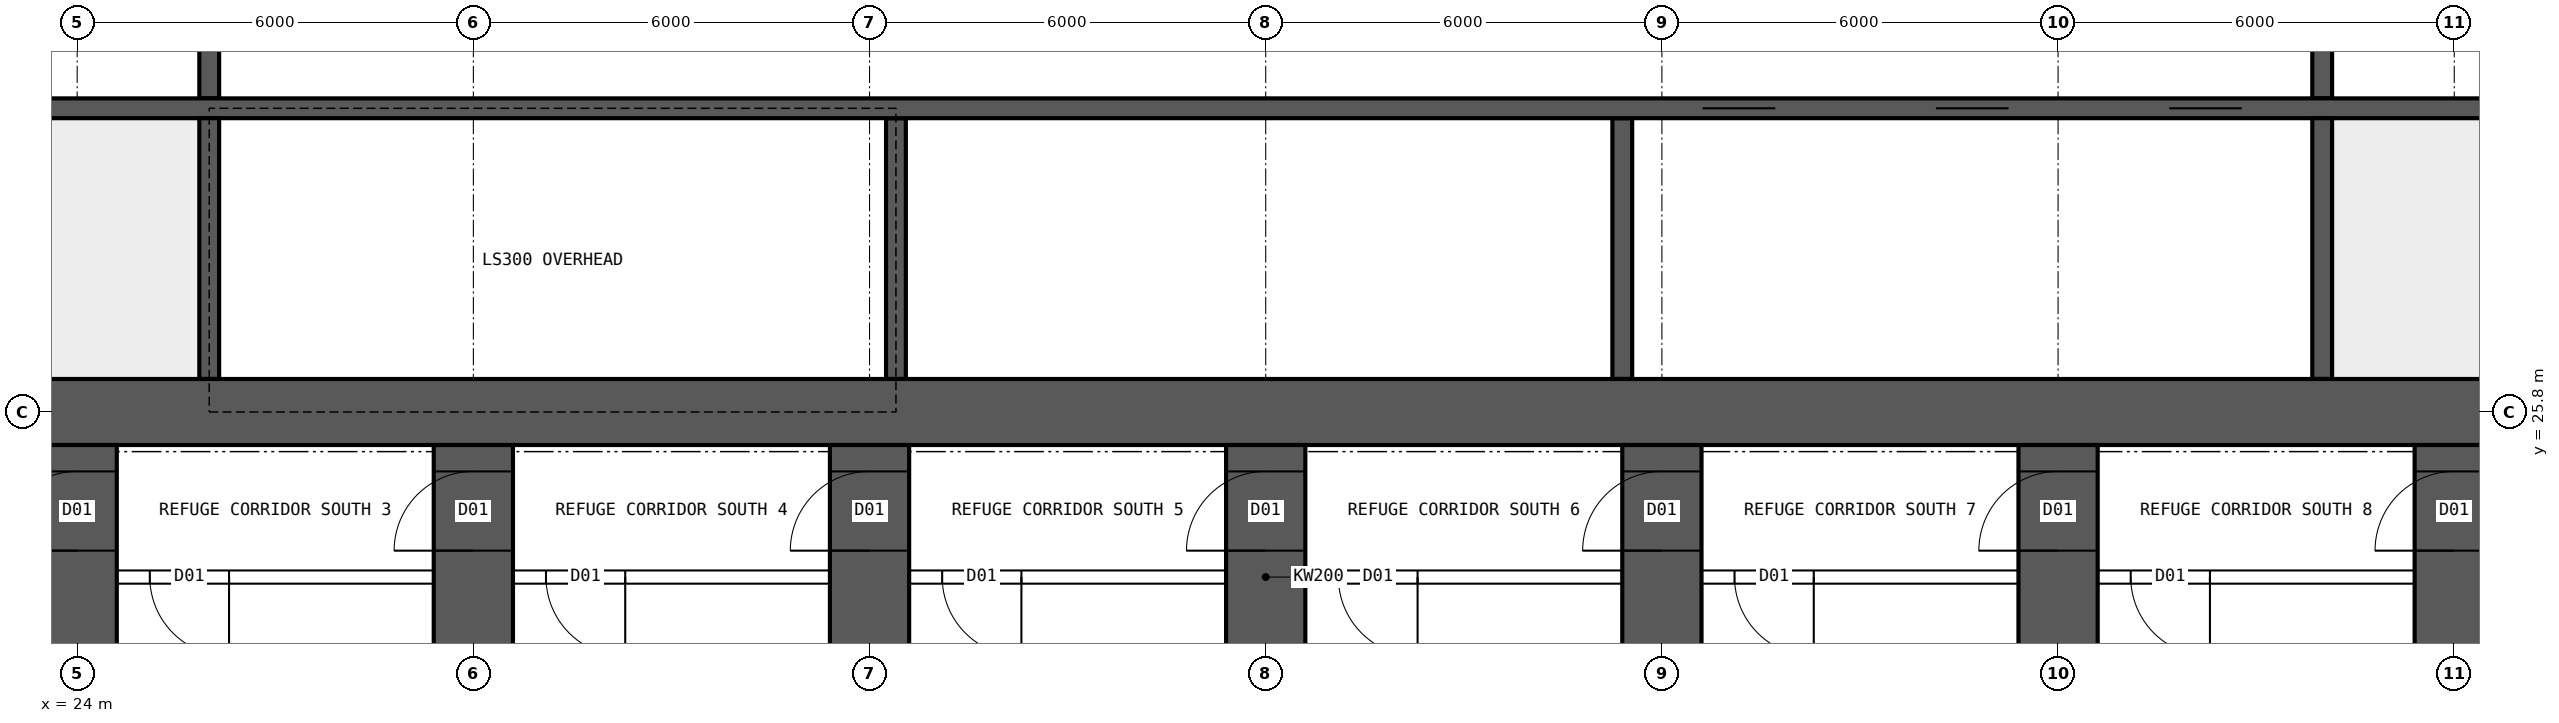
"""IFC4 building model, lengths in metres.
Left out: names, types, materials, properties, quantities, classifications, styles, units other than length and angle.
Written with IfcOpenShell. Run it as: python <this file> out.ifc"""

import sys

from ifc_helpers import new_model, si_unit, direction, frame, frame_2d, origin, place, context, subcontext, project, spatial, rectangle, extrude, element, fill, save


model = new_model("IFC4")
c1 = context("Model", 3, precision=1e-05, world=origin(), true_north=direction((0.0, 1.0)))
c2 = subcontext(c1, "Body", "Model", "MODEL_VIEW")
j1 = project(units=[si_unit("LENGTHUNIT", "METRE"), si_unit("PLANEANGLEUNIT", "RADIAN")], contexts=[c1])
p1 = place(None, origin())
s1 = spatial("IfcSite", under=j1, at=p1, CompositionType="ELEMENT")
p2 = place(p1, origin())
s2 = spatial("IfcBuilding", under=s1, at=p2, CompositionType="ELEMENT")
p3 = place(p2, frame((0.0, 0.0, 68.95)))
s3 = spatial("IfcBuildingStorey", under=s2, at=p3, CompositionType="ELEMENT", Elevation=68.95)
p4 = place(p3, frame((18.0, 25.8, 0.0), z_axis=(0.0, 0.0, 1.0), x_axis=(1.0, 0.0, 0.0)))
e1 = element("IfcWall", 1, at=p4, inside=s3, PredefinedType="SHEAR", context=c2, shape_type="SweptSolid", body=[
    extrude(rectangle(XDim=48.0, YDim=1.0, at=frame_2d((24.0, 0.0))), origin(), (0.0, 0.0, 1.0), 7.2),
])
p5 = place(p3, frame((18.5, 30.4, 0.0), z_axis=(0.0, 0.0, 1.0), x_axis=(1.0, 0.0, 0.0)))
e2 = element("IfcWall", 2, at=p5, inside=s3, PredefinedType="SHEAR", context=c2, shape_type="SweptSolid", body=[
    extrude(rectangle(XDim=47.0, YDim=0.3, at=frame_2d((23.5, 0.0))), origin(), (0.0, 0.0, 1.0), 7.2),
])
p6 = place(p5, frame((0.4, 0.0, 0.0)))
e3 = element("IfcOpeningElement", 3, at=p6, cuts=e2, PredefinedType="OPENING", context=c2, shape_type="SweptSolid", body=[
    extrude(rectangle(XDim=1.0, YDim=2.1, at=frame_2d((0.5, 1.05))), frame((0.0, 0.16, 0.0), z_axis=(0.0, -1.0, 0.0), x_axis=(1.0, 0.0, 0.0)), (0.0, 0.0, 1.0), 0.32),
])
p7 = place(p5, frame((45.6, 0.0, 0.0)))
e4 = element("IfcOpeningElement", 4, at=p7, cuts=e2, PredefinedType="OPENING", context=c2, shape_type="SweptSolid", body=[
    extrude(rectangle(XDim=1.0, YDim=2.1, at=frame_2d((0.5, 1.05))), frame((0.0, 0.16, 0.0), z_axis=(0.0, -1.0, 0.0), x_axis=(1.0, 0.0, 0.0)), (0.0, 0.0, 1.0), 0.32),
])
p8 = place(p5, frame((30.117, 0.0, 0.0)))
e5 = element("IfcOpeningElement", 5, at=p8, cuts=e2, PredefinedType="OPENING", context=c2, shape_type="SweptSolid", body=[
    extrude(rectangle(XDim=1.1, YDim=2.1, at=frame_2d((0.55, 1.05))), frame((0.0, 0.16, 0.0), z_axis=(0.0, -1.0, 0.0), x_axis=(1.0, 0.0, 0.0)), (0.0, 0.0, 1.0), 0.32),
])
p9 = place(p5, frame((33.65, 0.0, 0.0)))
e6 = element("IfcOpeningElement", 6, at=p9, cuts=e2, PredefinedType="OPENING", context=c2, shape_type="SweptSolid", body=[
    extrude(rectangle(XDim=1.1, YDim=2.1, at=frame_2d((0.55, 1.05))), frame((0.0, 0.16, 0.0), z_axis=(0.0, -1.0, 0.0), x_axis=(1.0, 0.0, 0.0)), (0.0, 0.0, 1.0), 0.32),
])
p10 = place(p5, frame((37.183, 0.0, 0.0)))
e7 = element("IfcOpeningElement", 7, at=p10, cuts=e2, PredefinedType="OPENING", context=c2, shape_type="SweptSolid", body=[
    extrude(rectangle(XDim=1.1, YDim=2.1, at=frame_2d((0.55, 1.05))), frame((0.0, 0.16, 0.0), z_axis=(0.0, -1.0, 0.0), x_axis=(1.0, 0.0, 0.0)), (0.0, 0.0, 1.0), 0.32),
])
for number, where, z_axis, x_axis in (
    (8, (26.0, 26.3, 0.0), (0.0, 0.0, 1.0), (0.0, 1.0, 0.0)),
    (9, (58.0, 26.3, 0.0), (0.0, 0.0, 1.0), (0.0, 1.0, 0.0)),
):
    element("IfcWall", number, at=place(p3, frame(where, z_axis=z_axis, x_axis=x_axis)), inside=s3, PredefinedType="SHEAR", context=c2, shape_type="SweptSolid", body=[
        extrude(rectangle(XDim=3.95, YDim=0.3, at=frame_2d((1.975, 0.0))), origin(), (0.0, 0.0, 1.0), 7.2),
    ])
p11 = place(p3, frame((26.0, 30.55, 0.0), z_axis=(0.0, 0.0, 1.0), x_axis=(0.0, 1.0, 0.0)))
e10 = element("IfcWall", 10, at=p11, inside=s3, PredefinedType="SHEAR", context=c2, shape_type="SweptSolid", body=[
    extrude(rectangle(XDim=3.9, YDim=0.3, at=frame_2d((1.95, 0.0))), origin(), (0.0, 0.0, 1.0), 7.2),
])
p12 = place(p11, frame((1.4, 0.0, 0.0)))
e11 = element("IfcOpeningElement", 11, at=p12, cuts=e10, PredefinedType="OPENING", context=c2, shape_type="SweptSolid", body=[
    extrude(rectangle(XDim=1.2, YDim=2.1, at=frame_2d((0.6, 1.05))), frame((0.0, 0.16, 0.0), z_axis=(0.0, -1.0, 0.0), x_axis=(1.0, 0.0, 0.0)), (0.0, 0.0, 1.0), 0.32),
])
p13 = place(p3, frame((58.0, 30.55, 0.0), z_axis=(0.0, 0.0, 1.0), x_axis=(0.0, 1.0, 0.0)))
e12 = element("IfcWall", 12, at=p13, inside=s3, PredefinedType="SHEAR", context=c2, shape_type="SweptSolid", body=[
    extrude(rectangle(XDim=3.9, YDim=0.3, at=frame_2d((1.95, 0.0))), origin(), (0.0, 0.0, 1.0), 7.2),
])
p14 = place(p13, frame((1.4, 0.0, 0.0)))
e13 = element("IfcOpeningElement", 13, at=p14, cuts=e12, PredefinedType="OPENING", context=c2, shape_type="SweptSolid", body=[
    extrude(rectangle(XDim=1.2, YDim=2.1, at=frame_2d((0.6, 1.05))), frame((0.0, 0.16, 0.0), z_axis=(0.0, -1.0, 0.0), x_axis=(1.0, 0.0, 0.0)), (0.0, 0.0, 1.0), 0.32),
])
for number, where, z_axis, x_axis in (
    (14, (36.4, 26.3, 0.0), (0.0, 0.0, 1.0), (0.0, 1.0, 0.0)),
    (15, (47.4, 26.3, 0.0), (0.0, 0.0, 1.0), (0.0, 1.0, 0.0)),
):
    element("IfcWall", number, at=place(p3, frame(where, z_axis=z_axis, x_axis=x_axis)), inside=s3, PredefinedType="SHEAR", context=c2, shape_type="SweptSolid", body=[
        extrude(rectangle(XDim=3.95, YDim=0.3, at=frame_2d((1.975, 0.0))), origin(), (0.0, 0.0, 1.0), 7.2),
    ])
p15 = place(p3, frame((24.0, 7.7, 0.0), z_axis=(0.0, 0.0, 1.0), x_axis=(0.0, 1.0, 0.0)))
e16 = element("IfcWall", 16, at=p15, inside=s3, PredefinedType="SHEAR", context=c2, shape_type="SweptSolid", body=[
    extrude(rectangle(XDim=17.6, YDim=1.2, at=frame_2d((8.8, 0.0))), origin(), (0.0, 0.0, 1.0), 7.2),
])
p16 = place(p15, frame((16.0, 0.0, 0.0)))
e17 = element("IfcOpeningElement", 17, at=p16, cuts=e16, PredefinedType="OPENING", context=c2, shape_type="SweptSolid", body=[
    extrude(rectangle(XDim=1.2, YDim=2.1, at=frame_2d((0.6, 1.05))), frame((0.0, 0.61, 0.0), z_axis=(0.0, -1.0, 0.0), x_axis=(1.0, 0.0, 0.0)), (0.0, 0.0, 1.0), 1.22),
])
p17 = place(p3, frame((30.0, 7.7, 0.0), z_axis=(0.0, 0.0, 1.0), x_axis=(0.0, 1.0, 0.0)))
e18 = element("IfcWall", 18, at=p17, inside=s3, PredefinedType="SHEAR", context=c2, shape_type="SweptSolid", body=[
    extrude(rectangle(XDim=17.6, YDim=1.2, at=frame_2d((8.8, 0.0))), origin(), (0.0, 0.0, 1.0), 7.2),
])
p18 = place(p17, frame((16.0, 0.0, 0.0)))
e19 = element("IfcOpeningElement", 19, at=p18, cuts=e18, PredefinedType="OPENING", context=c2, shape_type="SweptSolid", body=[
    extrude(rectangle(XDim=1.2, YDim=2.1, at=frame_2d((0.6, 1.05))), frame((0.0, 0.61, 0.0), z_axis=(0.0, -1.0, 0.0), x_axis=(1.0, 0.0, 0.0)), (0.0, 0.0, 1.0), 1.22),
])
p19 = place(p3, frame((36.0, 7.7, 0.0), z_axis=(0.0, 0.0, 1.0), x_axis=(0.0, 1.0, 0.0)))
e20 = element("IfcWall", 20, at=p19, inside=s3, PredefinedType="SHEAR", context=c2, shape_type="SweptSolid", body=[
    extrude(rectangle(XDim=17.6, YDim=1.2, at=frame_2d((8.8, 0.0))), origin(), (0.0, 0.0, 1.0), 7.2),
])
p20 = place(p19, frame((16.0, 0.0, 0.0)))
e21 = element("IfcOpeningElement", 21, at=p20, cuts=e20, PredefinedType="OPENING", context=c2, shape_type="SweptSolid", body=[
    extrude(rectangle(XDim=1.2, YDim=2.1, at=frame_2d((0.6, 1.05))), frame((0.0, 0.61, 0.0), z_axis=(0.0, -1.0, 0.0), x_axis=(1.0, 0.0, 0.0)), (0.0, 0.0, 1.0), 1.22),
])
p21 = place(p3, frame((42.0, 7.7, 0.0), z_axis=(0.0, 0.0, 1.0), x_axis=(0.0, 1.0, 0.0)))
e22 = element("IfcWall", 22, at=p21, inside=s3, PredefinedType="SHEAR", context=c2, shape_type="SweptSolid", body=[
    extrude(rectangle(XDim=17.6, YDim=1.2, at=frame_2d((8.8, 0.0))), origin(), (0.0, 0.0, 1.0), 7.2),
])
p22 = place(p21, frame((16.0, 0.0, 0.0)))
e23 = element("IfcOpeningElement", 23, at=p22, cuts=e22, PredefinedType="OPENING", context=c2, shape_type="SweptSolid", body=[
    extrude(rectangle(XDim=1.2, YDim=2.1, at=frame_2d((0.6, 1.05))), frame((0.0, 0.61, 0.0), z_axis=(0.0, -1.0, 0.0), x_axis=(1.0, 0.0, 0.0)), (0.0, 0.0, 1.0), 1.22),
])
p23 = place(p3, frame((48.0, 7.7, 0.0), z_axis=(0.0, 0.0, 1.0), x_axis=(0.0, 1.0, 0.0)))
e24 = element("IfcWall", 24, at=p23, inside=s3, PredefinedType="SHEAR", context=c2, shape_type="SweptSolid", body=[
    extrude(rectangle(XDim=17.6, YDim=1.2, at=frame_2d((8.8, 0.0))), origin(), (0.0, 0.0, 1.0), 7.2),
])
p24 = place(p23, frame((16.0, 0.0, 0.0)))
e25 = element("IfcOpeningElement", 25, at=p24, cuts=e24, PredefinedType="OPENING", context=c2, shape_type="SweptSolid", body=[
    extrude(rectangle(XDim=1.2, YDim=2.1, at=frame_2d((0.6, 1.05))), frame((0.0, 0.61, 0.0), z_axis=(0.0, -1.0, 0.0), x_axis=(1.0, 0.0, 0.0)), (0.0, 0.0, 1.0), 1.22),
])
p25 = place(p3, frame((54.0, 7.7, 0.0), z_axis=(0.0, 0.0, 1.0), x_axis=(0.0, 1.0, 0.0)))
e26 = element("IfcWall", 26, at=p25, inside=s3, PredefinedType="SHEAR", context=c2, shape_type="SweptSolid", body=[
    extrude(rectangle(XDim=17.6, YDim=1.2, at=frame_2d((8.8, 0.0))), origin(), (0.0, 0.0, 1.0), 7.2),
])
p26 = place(p25, frame((16.0, 0.0, 0.0)))
e27 = element("IfcOpeningElement", 27, at=p26, cuts=e26, PredefinedType="OPENING", context=c2, shape_type="SweptSolid", body=[
    extrude(rectangle(XDim=1.2, YDim=2.1, at=frame_2d((0.6, 1.05))), frame((0.0, 0.61, 0.0), z_axis=(0.0, -1.0, 0.0), x_axis=(1.0, 0.0, 0.0)), (0.0, 0.0, 1.0), 1.22),
])
p27 = place(p3, frame((60.0, 7.7, 0.0), z_axis=(0.0, 0.0, 1.0), x_axis=(0.0, 1.0, 0.0)))
e28 = element("IfcWall", 28, at=p27, inside=s3, PredefinedType="SHEAR", context=c2, shape_type="SweptSolid", body=[
    extrude(rectangle(XDim=17.6, YDim=1.2, at=frame_2d((8.8, 0.0))), origin(), (0.0, 0.0, 1.0), 7.2),
])
p28 = place(p27, frame((16.0, 0.0, 0.0)))
e29 = element("IfcOpeningElement", 29, at=p28, cuts=e28, PredefinedType="OPENING", context=c2, shape_type="SweptSolid", body=[
    extrude(rectangle(XDim=1.2, YDim=2.1, at=frame_2d((0.6, 1.05))), frame((0.0, 0.61, 0.0), z_axis=(0.0, -1.0, 0.0), x_axis=(1.0, 0.0, 0.0)), (0.0, 0.0, 1.0), 1.22),
])
p29 = place(p3, frame((68.4, 23.3, 0.0), z_axis=(0.0, 0.0, 1.0), x_axis=(-1.0, 0.0, 0.0)))
e30 = element("IfcWall", 30, at=p29, inside=s3, PredefinedType="SOLIDWALL", context=c2, shape_type="SweptSolid", body=[
    extrude(rectangle(XDim=52.8, YDim=0.2, at=frame_2d((26.4, 0.0))), origin(), (0.0, 0.0, 1.0), 6.9),
])
p30 = place(p29, frame((51.0, 0.0, 0.0)))
e31 = element("IfcOpeningElement", 31, at=p30, cuts=e30, PredefinedType="OPENING", context=c2, shape_type="SweptSolid", body=[
    extrude(rectangle(XDim=1.2, YDim=2.1, at=frame_2d((0.6, 1.05))), frame((0.0, 0.11, 0.0), z_axis=(0.0, -1.0, 0.0), x_axis=(1.0, 0.0, 0.0)), (0.0, 0.0, 1.0), 0.22),
])
p31 = place(p29, frame((48.1, 0.0, 0.0)))
e32 = element("IfcOpeningElement", 32, at=p31, cuts=e30, PredefinedType="OPENING", context=c2, shape_type="SweptSolid", body=[
    extrude(rectangle(XDim=1.2, YDim=2.1, at=frame_2d((0.6, 1.05))), frame((0.0, 0.11, 0.0), z_axis=(0.0, -1.0, 0.0), x_axis=(1.0, 0.0, 0.0)), (0.0, 0.0, 1.0), 0.22),
])
p32 = place(p29, frame((42.1, 0.0, 0.0)))
e33 = element("IfcOpeningElement", 33, at=p32, cuts=e30, PredefinedType="OPENING", context=c2, shape_type="SweptSolid", body=[
    extrude(rectangle(XDim=1.2, YDim=2.1, at=frame_2d((0.6, 1.05))), frame((0.0, 0.11, 0.0), z_axis=(0.0, -1.0, 0.0), x_axis=(1.0, 0.0, 0.0)), (0.0, 0.0, 1.0), 0.22),
])
p33 = place(p29, frame((36.1, 0.0, 0.0)))
e34 = element("IfcOpeningElement", 34, at=p33, cuts=e30, PredefinedType="OPENING", context=c2, shape_type="SweptSolid", body=[
    extrude(rectangle(XDim=1.2, YDim=2.1, at=frame_2d((0.6, 1.05))), frame((0.0, 0.11, 0.0), z_axis=(0.0, -1.0, 0.0), x_axis=(1.0, 0.0, 0.0)), (0.0, 0.0, 1.0), 0.22),
])
p34 = place(p29, frame((30.1, 0.0, 0.0)))
e35 = element("IfcOpeningElement", 35, at=p34, cuts=e30, PredefinedType="OPENING", context=c2, shape_type="SweptSolid", body=[
    extrude(rectangle(XDim=1.2, YDim=2.1, at=frame_2d((0.6, 1.05))), frame((0.0, 0.11, 0.0), z_axis=(0.0, -1.0, 0.0), x_axis=(1.0, 0.0, 0.0)), (0.0, 0.0, 1.0), 0.22),
])
p35 = place(p29, frame((24.1, 0.0, 0.0)))
e36 = element("IfcOpeningElement", 36, at=p35, cuts=e30, PredefinedType="OPENING", context=c2, shape_type="SweptSolid", body=[
    extrude(rectangle(XDim=1.2, YDim=2.1, at=frame_2d((0.6, 1.05))), frame((0.0, 0.11, 0.0), z_axis=(0.0, -1.0, 0.0), x_axis=(1.0, 0.0, 0.0)), (0.0, 0.0, 1.0), 0.22),
])
p36 = place(p29, frame((18.1, 0.0, 0.0)))
e37 = element("IfcOpeningElement", 37, at=p36, cuts=e30, PredefinedType="OPENING", context=c2, shape_type="SweptSolid", body=[
    extrude(rectangle(XDim=1.2, YDim=2.1, at=frame_2d((0.6, 1.05))), frame((0.0, 0.11, 0.0), z_axis=(0.0, -1.0, 0.0), x_axis=(1.0, 0.0, 0.0)), (0.0, 0.0, 1.0), 0.22),
])
p37 = place(p29, frame((12.1, 0.0, 0.0)))
e38 = element("IfcOpeningElement", 38, at=p37, cuts=e30, PredefinedType="OPENING", context=c2, shape_type="SweptSolid", body=[
    extrude(rectangle(XDim=1.2, YDim=2.1, at=frame_2d((0.6, 1.05))), frame((0.0, 0.11, 0.0), z_axis=(0.0, -1.0, 0.0), x_axis=(1.0, 0.0, 0.0)), (0.0, 0.0, 1.0), 0.22),
])
p38 = place(p29, frame((6.1, 0.0, 0.0)))
e39 = element("IfcOpeningElement", 39, at=p38, cuts=e30, PredefinedType="OPENING", context=c2, shape_type="SweptSolid", body=[
    extrude(rectangle(XDim=1.2, YDim=2.1, at=frame_2d((0.6, 1.05))), frame((0.0, 0.11, 0.0), z_axis=(0.0, -1.0, 0.0), x_axis=(1.0, 0.0, 0.0)), (0.0, 0.0, 1.0), 0.22),
])
p39 = place(p29, frame((0.1, 0.0, 0.0)))
e40 = element("IfcOpeningElement", 40, at=p39, cuts=e30, PredefinedType="OPENING", context=c2, shape_type="SweptSolid", body=[
    extrude(rectangle(XDim=1.2, YDim=2.1, at=frame_2d((0.6, 1.05))), frame((0.0, 0.11, 0.0), z_axis=(0.0, -1.0, 0.0), x_axis=(1.0, 0.0, 0.0)), (0.0, 0.0, 1.0), 0.22),
])
p40 = place(p8, origin())
e41 = element("IfcDoor", 41, at=p40, inside=s3, OperationType="DOUBLE_DOOR_SLIDING", PredefinedType="DOOR", context=c2, shape_type="SweptSolid", body=[
    extrude(rectangle(XDim=1.1, YDim=2.1, at=frame_2d((0.55, 1.05))), frame((0.0, 0.025, 0.0), z_axis=(0.0, -1.0, 0.0), x_axis=(1.0, 0.0, 0.0)), (0.0, 0.0, 1.0), 0.05),
])
fill(e5, e41)
p41 = place(p9, origin())
e42 = element("IfcDoor", 42, at=p41, inside=s3, OperationType="DOUBLE_DOOR_SLIDING", PredefinedType="DOOR", context=c2, shape_type="SweptSolid", body=[
    extrude(rectangle(XDim=1.1, YDim=2.1, at=frame_2d((0.55, 1.05))), frame((0.0, 0.025, 0.0), z_axis=(0.0, -1.0, 0.0), x_axis=(1.0, 0.0, 0.0)), (0.0, 0.0, 1.0), 0.05),
])
fill(e6, e42)
p42 = place(p10, origin())
e43 = element("IfcDoor", 43, at=p42, inside=s3, OperationType="DOUBLE_DOOR_SLIDING", PredefinedType="DOOR", context=c2, shape_type="SweptSolid", body=[
    extrude(rectangle(XDim=1.1, YDim=2.1, at=frame_2d((0.55, 1.05))), frame((0.0, 0.025, 0.0), z_axis=(0.0, -1.0, 0.0), x_axis=(1.0, 0.0, 0.0)), (0.0, 0.0, 1.0), 0.05),
])
fill(e7, e43)
p43 = place(p32, origin())
e44 = element("IfcDoor", 44, at=p43, inside=s3, OperationType="SINGLE_SWING_LEFT", PredefinedType="DOOR", context=c2, shape_type="SweptSolid", body=[
    extrude(rectangle(XDim=1.2, YDim=2.1, at=frame_2d((0.6, 1.05))), frame((0.0, 0.025, 0.0), z_axis=(0.0, -1.0, 0.0), x_axis=(1.0, 0.0, 0.0)), (0.0, 0.0, 1.0), 0.05),
])
fill(e33, e44)
p44 = place(p33, origin())
e45 = element("IfcDoor", 45, at=p44, inside=s3, OperationType="SINGLE_SWING_LEFT", PredefinedType="DOOR", context=c2, shape_type="SweptSolid", body=[
    extrude(rectangle(XDim=1.2, YDim=2.1, at=frame_2d((0.6, 1.05))), frame((0.0, 0.025, 0.0), z_axis=(0.0, -1.0, 0.0), x_axis=(1.0, 0.0, 0.0)), (0.0, 0.0, 1.0), 0.05),
])
fill(e34, e45)
p45 = place(p34, origin())
e46 = element("IfcDoor", 46, at=p45, inside=s3, OperationType="SINGLE_SWING_LEFT", PredefinedType="DOOR", context=c2, shape_type="SweptSolid", body=[
    extrude(rectangle(XDim=1.2, YDim=2.1, at=frame_2d((0.6, 1.05))), frame((0.0, 0.025, 0.0), z_axis=(0.0, -1.0, 0.0), x_axis=(1.0, 0.0, 0.0)), (0.0, 0.0, 1.0), 0.05),
])
fill(e35, e46)
p46 = place(p35, origin())
e47 = element("IfcDoor", 47, at=p46, inside=s3, OperationType="SINGLE_SWING_LEFT", PredefinedType="DOOR", context=c2, shape_type="SweptSolid", body=[
    extrude(rectangle(XDim=1.2, YDim=2.1, at=frame_2d((0.6, 1.05))), frame((0.0, 0.025, 0.0), z_axis=(0.0, -1.0, 0.0), x_axis=(1.0, 0.0, 0.0)), (0.0, 0.0, 1.0), 0.05),
])
fill(e36, e47)
p47 = place(p36, origin())
e48 = element("IfcDoor", 48, at=p47, inside=s3, OperationType="SINGLE_SWING_LEFT", PredefinedType="DOOR", context=c2, shape_type="SweptSolid", body=[
    extrude(rectangle(XDim=1.2, YDim=2.1, at=frame_2d((0.6, 1.05))), frame((0.0, 0.025, 0.0), z_axis=(0.0, -1.0, 0.0), x_axis=(1.0, 0.0, 0.0)), (0.0, 0.0, 1.0), 0.05),
])
fill(e37, e48)
p48 = place(p37, origin())
e49 = element("IfcDoor", 49, at=p48, inside=s3, OperationType="SINGLE_SWING_LEFT", PredefinedType="DOOR", context=c2, shape_type="SweptSolid", body=[
    extrude(rectangle(XDim=1.2, YDim=2.1, at=frame_2d((0.6, 1.05))), frame((0.0, 0.025, 0.0), z_axis=(0.0, -1.0, 0.0), x_axis=(1.0, 0.0, 0.0)), (0.0, 0.0, 1.0), 0.05),
])
fill(e38, e49)
p49 = place(p16, origin())
e50 = element("IfcDoor", 50, at=p49, inside=s3, OperationType="SINGLE_SWING_LEFT", PredefinedType="DOOR", context=c2, shape_type="SweptSolid", body=[
    extrude(rectangle(XDim=1.2, YDim=2.1, at=frame_2d((0.6, 1.05))), frame((0.0, 0.025, 0.0), z_axis=(0.0, -1.0, 0.0), x_axis=(1.0, 0.0, 0.0)), (0.0, 0.0, 1.0), 0.05),
])
fill(e17, e50)
p50 = place(p18, origin())
e51 = element("IfcDoor", 51, at=p50, inside=s3, OperationType="SINGLE_SWING_LEFT", PredefinedType="DOOR", context=c2, shape_type="SweptSolid", body=[
    extrude(rectangle(XDim=1.2, YDim=2.1, at=frame_2d((0.6, 1.05))), frame((0.0, 0.025, 0.0), z_axis=(0.0, -1.0, 0.0), x_axis=(1.0, 0.0, 0.0)), (0.0, 0.0, 1.0), 0.05),
])
fill(e19, e51)
p51 = place(p20, origin())
e52 = element("IfcDoor", 52, at=p51, inside=s3, OperationType="SINGLE_SWING_LEFT", PredefinedType="DOOR", context=c2, shape_type="SweptSolid", body=[
    extrude(rectangle(XDim=1.2, YDim=2.1, at=frame_2d((0.6, 1.05))), frame((0.0, 0.025, 0.0), z_axis=(0.0, -1.0, 0.0), x_axis=(1.0, 0.0, 0.0)), (0.0, 0.0, 1.0), 0.05),
])
fill(e21, e52)
p52 = place(p22, origin())
e53 = element("IfcDoor", 53, at=p52, inside=s3, OperationType="SINGLE_SWING_LEFT", PredefinedType="DOOR", context=c2, shape_type="SweptSolid", body=[
    extrude(rectangle(XDim=1.2, YDim=2.1, at=frame_2d((0.6, 1.05))), frame((0.0, 0.025, 0.0), z_axis=(0.0, -1.0, 0.0), x_axis=(1.0, 0.0, 0.0)), (0.0, 0.0, 1.0), 0.05),
])
fill(e23, e53)
p53 = place(p24, origin())
e54 = element("IfcDoor", 54, at=p53, inside=s3, OperationType="SINGLE_SWING_LEFT", PredefinedType="DOOR", context=c2, shape_type="SweptSolid", body=[
    extrude(rectangle(XDim=1.2, YDim=2.1, at=frame_2d((0.6, 1.05))), frame((0.0, 0.025, 0.0), z_axis=(0.0, -1.0, 0.0), x_axis=(1.0, 0.0, 0.0)), (0.0, 0.0, 1.0), 0.05),
])
fill(e25, e54)
p54 = place(p26, origin())
e55 = element("IfcDoor", 55, at=p54, inside=s3, OperationType="SINGLE_SWING_LEFT", PredefinedType="DOOR", context=c2, shape_type="SweptSolid", body=[
    extrude(rectangle(XDim=1.2, YDim=2.1, at=frame_2d((0.6, 1.05))), frame((0.0, 0.025, 0.0), z_axis=(0.0, -1.0, 0.0), x_axis=(1.0, 0.0, 0.0)), (0.0, 0.0, 1.0), 0.05),
])
fill(e27, e55)
p55 = place(p28, origin())
e56 = element("IfcDoor", 56, at=p55, inside=s3, OperationType="SINGLE_SWING_LEFT", PredefinedType="DOOR", context=c2, shape_type="SweptSolid", body=[
    extrude(rectangle(XDim=1.2, YDim=2.1, at=frame_2d((0.6, 1.05))), frame((0.0, 0.025, 0.0), z_axis=(0.0, -1.0, 0.0), x_axis=(1.0, 0.0, 0.0)), (0.0, 0.0, 1.0), 0.05),
])
fill(e29, e56)
save(model, sys.argv[1])
